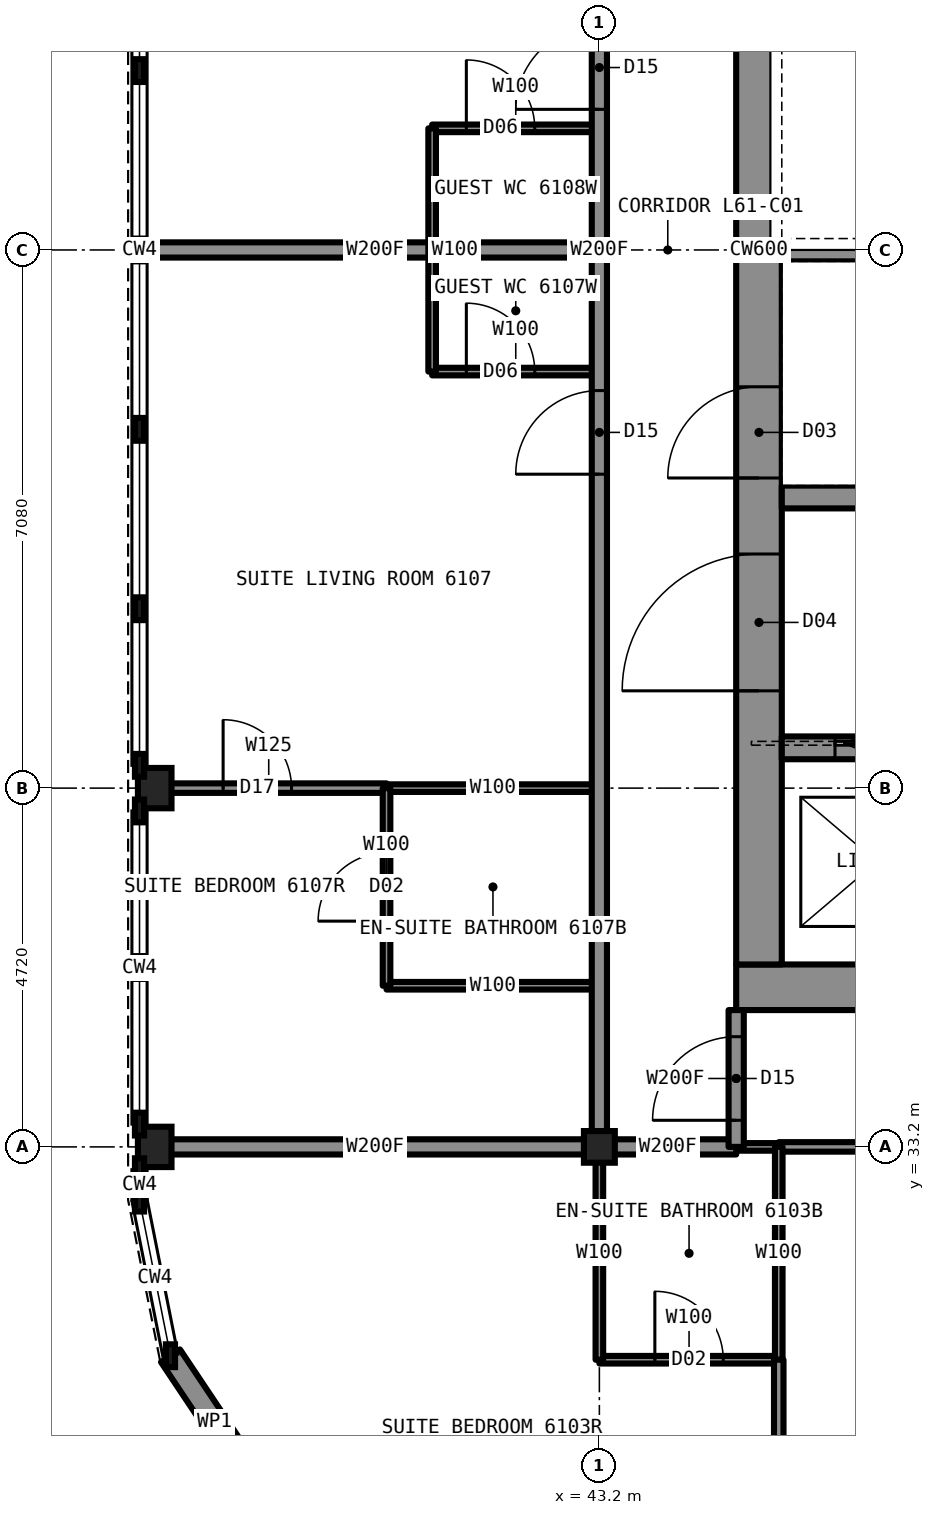
"""IFC4 building model, lengths in metres.
Left out: names, types, materials, properties, quantities, classifications, styles, units other than length and angle.
Written with IfcOpenShell. Run it as: python <this file> out.ifc"""

import sys

from ifc_helpers import new_model, si_unit, direction, frame, frame_2d, origin, origin_2d, place, context, subcontext, project, spatial, rectangle, i_section, extrude, element, fill, save


model = new_model("IFC4")
c1 = context("Model", 3, precision=1e-05, world=origin(), true_north=direction((0.0, 1.0)))
c2 = subcontext(c1, "Body", "Model", "MODEL_VIEW")
j1 = project(units=[si_unit("LENGTHUNIT", "METRE"), si_unit("PLANEANGLEUNIT", "RADIAN")], contexts=[c1])
p1 = place(None, origin())
s1 = spatial("IfcSite", under=j1, at=p1, CompositionType="ELEMENT")
p2 = place(p1, origin())
s2 = spatial("IfcBuilding", under=s1, at=p2, CompositionType="ELEMENT")
p3 = place(p2, frame((0.0, 0.0, 226.7)))
s3 = spatial("IfcBuildingStorey", under=s2, at=p3, CompositionType="ELEMENT", Elevation=226.7)
for number, where, z_axis, x_axis in (
    (1, (37.35, 33.2, 0.0), (0.0, 0.0, 1.0), (1.0, 0.0, 0.0)),
    (2, (37.35, 37.92, 0.0), (0.0, 0.0, 1.0), (1.0, 0.0, 0.0)),
):
    element("IfcColumn", number, at=place(p3, frame(where, z_axis=z_axis, x_axis=x_axis)), inside=s3, PredefinedType="COLUMN", context=c2, shape_type="SweptSolid", body=[
        extrude(i_section(OverallWidth=0.442, OverallDepth=0.531, WebThickness=0.066, FlangeThickness=0.106, at=origin_2d()), origin(), (0.0, 0.0, 1.0), 3.5),
    ])
p4 = place(p3, frame((43.2, 33.2, 0.0), z_axis=(0.0, 0.0, 1.0), x_axis=(1.0, 0.0, 0.0)))
e3 = element("IfcColumn", 3, at=p4, inside=s3, PredefinedType="COLUMN", context=c2, shape_type="SweptSolid", body=[
    extrude(i_section(OverallWidth=0.406, OverallDepth=0.417, WebThickness=0.03, FlangeThickness=0.048, at=origin_2d()), origin(), (0.0, 0.0, 1.0), 3.5),
])
p5 = place(p3, frame((45.0, 35.3, 0.0), z_axis=(0.0, 0.0, 1.0), x_axis=(1.0, 0.0, 0.0)))
e4 = element("IfcWall", 4, at=p5, inside=s3, PredefinedType="SHEAR", context=c2, shape_type="SweptSolid", body=[
    extrude(rectangle(XDim=20.0, YDim=0.6, at=frame_2d((10.0, 0.0))), origin(), (0.0, 0.0, 1.0), 3.5),
])
p6 = place(p3, frame((45.3, 35.6, 0.0), z_axis=(0.0, 0.0, 1.0), x_axis=(0.0, 1.0, 0.0)))
e5 = element("IfcWall", 5, at=p6, inside=s3, PredefinedType="SHEAR", context=c2, shape_type="SweptSolid", body=[
    extrude(rectangle(XDim=18.8, YDim=0.6, at=frame_2d((9.4, 0.0))), origin(), (0.0, 0.0, 1.0), 3.5),
])
p7 = place(p6, frame((13.4, 0.0, 0.0)))
e6 = element("IfcOpeningElement", 6, at=p7, cuts=e5, PredefinedType="OPENING", context=c2, shape_type="SweptSolid", body=[
    extrude(rectangle(XDim=1.8, YDim=2.2, at=frame_2d((0.9, 1.1))), frame((0.0, 0.31, 0.0), z_axis=(0.0, -1.0, 0.0), x_axis=(1.0, 0.0, 0.0)), (0.0, 0.0, 1.0), 0.62),
])
p8 = place(p6, frame((3.6, 0.0, 0.0)))
e7 = element("IfcOpeningElement", 7, at=p8, cuts=e5, PredefinedType="OPENING", context=c2, shape_type="SweptSolid", body=[
    extrude(rectangle(XDim=1.8, YDim=2.2, at=frame_2d((0.9, 1.1))), frame((0.0, 0.31, 0.0), z_axis=(0.0, -1.0, 0.0), x_axis=(1.0, 0.0, 0.0)), (0.0, 0.0, 1.0), 0.62),
])
p9 = place(p6, frame((6.4, 0.0, 0.0)))
e8 = element("IfcOpeningElement", 8, at=p9, cuts=e5, PredefinedType="OPENING", context=c2, shape_type="SweptSolid", body=[
    extrude(rectangle(XDim=1.2, YDim=2.2, at=frame_2d((0.6, 1.1))), frame((0.0, 0.31, 0.0), z_axis=(0.0, -1.0, 0.0), x_axis=(1.0, 0.0, 0.0)), (0.0, 0.0, 1.0), 0.62),
])
p10 = place(p3, frame((45.6, 38.45, 0.0), z_axis=(0.0, 0.0, 1.0), x_axis=(1.0, 0.0, 0.0)))
e9 = element("IfcWall", 9, at=p10, inside=s3, PredefinedType="SHEAR", context=c2, shape_type="SweptSolid", body=[
    extrude(rectangle(XDim=18.8, YDim=0.3, at=frame_2d((9.4, 0.0))), origin(), (0.0, 0.0, 1.0), 3.5),
])
p11 = place(p10, frame((0.7, 0.0, 0.0)))
e10 = element("IfcOpeningElement", 10, at=p11, cuts=e9, PredefinedType="OPENING", context=c2, shape_type="SweptSolid", body=[
    extrude(rectangle(XDim=1.1, YDim=2.2, at=frame_2d((0.55, 1.1))), frame((0.0, 0.16, 0.0), z_axis=(0.0, -1.0, 0.0), x_axis=(1.0, 0.0, 0.0)), (0.0, 0.0, 1.0), 0.32),
])
p12 = place(p10, frame((3.4, 0.0, 0.0)))
e11 = element("IfcOpeningElement", 11, at=p12, cuts=e9, PredefinedType="OPENING", context=c2, shape_type="SweptSolid", body=[
    extrude(rectangle(XDim=1.1, YDim=2.2, at=frame_2d((0.55, 1.1))), frame((0.0, 0.16, 0.0), z_axis=(0.0, -1.0, 0.0), x_axis=(1.0, 0.0, 0.0)), (0.0, 0.0, 1.0), 0.32),
])
p13 = place(p10, frame((6.1, 0.0, 0.0)))
e12 = element("IfcOpeningElement", 12, at=p13, cuts=e9, PredefinedType="OPENING", context=c2, shape_type="SweptSolid", body=[
    extrude(rectangle(XDim=1.1, YDim=2.2, at=frame_2d((0.55, 1.1))), frame((0.0, 0.16, 0.0), z_axis=(0.0, -1.0, 0.0), x_axis=(1.0, 0.0, 0.0)), (0.0, 0.0, 1.0), 0.32),
])
p14 = place(p10, frame((8.8, 0.0, 0.0)))
e13 = element("IfcOpeningElement", 13, at=p14, cuts=e9, PredefinedType="OPENING", context=c2, shape_type="SweptSolid", body=[
    extrude(rectangle(XDim=1.1, YDim=2.2, at=frame_2d((0.55, 1.1))), frame((0.0, 0.16, 0.0), z_axis=(0.0, -1.0, 0.0), x_axis=(1.0, 0.0, 0.0)), (0.0, 0.0, 1.0), 0.32),
])
p15 = place(p3, frame((45.6, 41.75, 0.0), z_axis=(0.0, 0.0, 1.0), x_axis=(1.0, 0.0, 0.0)))
e14 = element("IfcWall", 14, at=p15, inside=s3, PredefinedType="SHEAR", context=c2, shape_type="SweptSolid", body=[
    extrude(rectangle(XDim=7.1, YDim=0.3, at=frame_2d((3.55, 0.0))), origin(), (0.0, 0.0, 1.0), 3.5),
])
p16 = place(p3, frame((45.6, 45.0, 0.0), z_axis=(0.0, 0.0, 1.0), x_axis=(1.0, 0.0, 0.0)))
e15 = element("IfcWall", 15, at=p16, inside=s3, PredefinedType="SHEAR", context=c2, shape_type="SweptSolid", body=[
    extrude(rectangle(XDim=6.8, YDim=0.3, at=frame_2d((3.4, 0.0))), origin(), (0.0, 0.0, 1.0), 3.5),
])
p17 = place(p3, frame((41.0, 43.4, 0.0), z_axis=(0.0, 0.0, 1.0), x_axis=(1.0, 0.0, 0.0)))
e16 = element("IfcWall", 16, at=p17, inside=s3, PredefinedType="PARTITIONING", context=c2, shape_type="SweptSolid", body=[
    extrude(rectangle(XDim=2.2, YDim=0.1, at=frame_2d((1.1, 0.0))), origin(), (0.0, 0.0, 1.0), 3.33),
])
p18 = place(p17, frame((0.45, 0.0, 0.0)))
e17 = element("IfcOpeningElement", 17, at=p18, cuts=e16, PredefinedType="OPENING", context=c2, shape_type="SweptSolid", body=[
    extrude(rectangle(XDim=0.9, YDim=2.1, at=frame_2d((0.45, 1.05))), frame((0.0, 0.06, 0.0), z_axis=(0.0, -1.0, 0.0), x_axis=(1.0, 0.0, 0.0)), (0.0, 0.0, 1.0), 0.12),
])
p19 = place(p3, frame((45.0, 33.2, 0.0), z_axis=(0.0, 0.0, 1.0), x_axis=(1.0, 0.0, 0.0)))
e18 = element("IfcWall", 18, at=p19, inside=s3, PredefinedType="PARTITIONING", context=c2, shape_type="SweptSolid", body=[
    extrude(rectangle(XDim=0.56, YDim=0.1, at=frame_2d((0.28, 0.0))), origin(), (0.0, 0.0, 1.0), 3.33),
])
p20 = place(p3, frame((43.2, 33.2, 0.0), z_axis=(0.0, 0.0, 1.0), x_axis=(1.0, 0.0, 0.0)))
e19 = element("IfcWall", 19, at=p20, inside=s3, PredefinedType="PARTITIONING", context=c2, shape_type="SweptSolid", body=[
    extrude(rectangle(XDim=1.8, YDim=0.2, at=frame_2d((0.9, 0.0))), origin(), (0.0, 0.0, 1.0), 3.33),
])
p21 = place(p3, frame((37.3, 33.2, 0.0), z_axis=(0.0, 0.0, 1.0), x_axis=(1.0, 0.0, 0.0)))
e20 = element("IfcWall", 20, at=p21, inside=s3, PredefinedType="PARTITIONING", context=c2, shape_type="SweptSolid", body=[
    extrude(rectangle(XDim=5.9, YDim=0.2, at=frame_2d((2.95, 0.0))), origin(), (0.0, 0.0, 1.0), 2.573),
])
p22 = place(p3, frame((45.56, 33.2, 0.0), z_axis=(0.0, 0.0, 1.0), x_axis=(1.0, 0.0, 0.0)))
e21 = element("IfcWall", 21, at=p22, inside=s3, PredefinedType="PARTITIONING", context=c2, shape_type="SweptSolid", body=[
    extrude(rectangle(XDim=7.84, YDim=0.125, at=frame_2d((3.92, 0.0))), origin(), (0.0, 0.0, 1.0), 3.33),
])
p23 = place(p22, frame((3.49, 0.0, 0.0)))
e22 = element("IfcOpeningElement", 22, at=p23, cuts=e21, PredefinedType="OPENING", context=c2, shape_type="SweptSolid", body=[
    extrude(rectangle(XDim=0.9, YDim=2.2, at=frame_2d((0.45, 1.1))), frame((0.0, 0.073, 0.0), z_axis=(0.0, -1.0, 0.0), x_axis=(1.0, 0.0, 0.0)), (0.0, 0.0, 1.0), 0.145),
])
p24 = place(p3, frame((43.2, 30.4, 0.0), z_axis=(0.0, 0.0, 1.0), x_axis=(1.0, 0.0, 0.0)))
e23 = element("IfcWall", 23, at=p24, inside=s3, PredefinedType="PARTITIONING", context=c2, shape_type="SweptSolid", body=[
    extrude(rectangle(XDim=2.36, YDim=0.1, at=frame_2d((1.18, 0.0))), origin(), (0.0, 0.0, 1.0), 3.33),
])
p25 = place(p24, frame((0.73, 0.0, 0.0)))
e24 = element("IfcOpeningElement", 24, at=p25, cuts=e23, PredefinedType="OPENING", context=c2, shape_type="SweptSolid", body=[
    extrude(rectangle(XDim=0.9, YDim=2.1, at=frame_2d((0.45, 1.05))), frame((0.0, 0.06, 0.0), z_axis=(0.0, -1.0, 0.0), x_axis=(1.0, 0.0, 0.0)), (0.0, 0.0, 1.0), 0.12),
])
p26 = place(p3, frame((40.4, 37.92, 0.0), z_axis=(0.0, 0.0, 1.0), x_axis=(1.0, 0.0, 0.0)))
e25 = element("IfcWall", 25, at=p26, inside=s3, PredefinedType="PARTITIONING", context=c2, shape_type="SweptSolid", body=[
    extrude(rectangle(XDim=2.8, YDim=0.1, at=frame_2d((1.4, 0.0))), origin(), (0.0, 0.0, 1.0), 2.573),
])
p27 = place(p3, frame((37.3, 37.92, 0.0), z_axis=(0.0, 0.0, 1.0), x_axis=(1.0, 0.0, 0.0)))
e26 = element("IfcWall", 26, at=p27, inside=s3, PredefinedType="PARTITIONING", context=c2, shape_type="SweptSolid", body=[
    extrude(rectangle(XDim=3.1, YDim=0.125, at=frame_2d((1.55, 0.0))), origin(), (0.0, 0.0, 1.0), 2.573),
])
p28 = place(p27, frame((0.95, 0.0, 0.0)))
e27 = element("IfcOpeningElement", 27, at=p28, cuts=e26, PredefinedType="OPENING", context=c2, shape_type="SweptSolid", body=[
    extrude(rectangle(XDim=0.9, YDim=2.2, at=frame_2d((0.45, 1.1))), frame((0.0, 0.073, 0.0), z_axis=(0.0, -1.0, 0.0), x_axis=(1.0, 0.0, 0.0)), (0.0, 0.0, 1.0), 0.145),
])
p29 = place(p3, frame((40.4, 35.32, 0.0), z_axis=(0.0, 0.0, 1.0), x_axis=(1.0, 0.0, 0.0)))
e28 = element("IfcWall", 28, at=p29, inside=s3, PredefinedType="PARTITIONING", context=c2, shape_type="SweptSolid", body=[
    extrude(rectangle(XDim=2.8, YDim=0.1, at=frame_2d((1.4, 0.0))), origin(), (0.0, 0.0, 1.0), 3.33),
])
p30 = place(p3, frame((37.3, 45.0, 0.0), z_axis=(0.0, 0.0, 1.0), x_axis=(1.0, 0.0, 0.0)))
e29 = element("IfcWall", 29, at=p30, inside=s3, PredefinedType="PARTITIONING", context=c2, shape_type="SweptSolid", body=[
    extrude(rectangle(XDim=5.9, YDim=0.2, at=frame_2d((2.95, 0.0))), origin(), (0.0, 0.0, 1.0), 2.797),
])
p31 = place(p3, frame((41.0, 46.6, 0.0), z_axis=(0.0, 0.0, 1.0), x_axis=(1.0, 0.0, 0.0)))
e30 = element("IfcWall", 30, at=p31, inside=s3, PredefinedType="PARTITIONING", context=c2, shape_type="SweptSolid", body=[
    extrude(rectangle(XDim=2.2, YDim=0.1, at=frame_2d((1.1, 0.0))), origin(), (0.0, 0.0, 1.0), 3.33),
])
p32 = place(p31, frame((0.45, 0.0, 0.0)))
e31 = element("IfcOpeningElement", 31, at=p32, cuts=e30, PredefinedType="OPENING", context=c2, shape_type="SweptSolid", body=[
    extrude(rectangle(XDim=0.9, YDim=2.1, at=frame_2d((0.45, 1.05))), frame((0.0, 0.06, 0.0), z_axis=(0.0, -1.0, 0.0), x_axis=(1.0, 0.0, 0.0)), (0.0, 0.0, 1.0), 0.12),
])
p33 = place(p3, frame((45.0, 33.2, 0.0), z_axis=(0.0, 0.0, 1.0), x_axis=(0.0, 1.0, 0.0)))
e32 = element("IfcWall", 32, at=p33, inside=s3, PredefinedType="PARTITIONING", context=c2, shape_type="SweptSolid", body=[
    extrude(rectangle(XDim=1.8, YDim=0.2, at=frame_2d((0.9, 0.0))), origin(), (0.0, 0.0, 1.0), 3.33),
])
p34 = place(p33, frame((0.35, 0.0, 0.0)))
e33 = element("IfcOpeningElement", 33, at=p34, cuts=e32, PredefinedType="OPENING", context=c2, shape_type="SweptSolid", body=[
    extrude(rectangle(XDim=1.1, YDim=2.2, at=frame_2d((0.55, 1.1))), frame((0.0, 0.11, 0.0), z_axis=(0.0, -1.0, 0.0), x_axis=(1.0, 0.0, 0.0)), (0.0, 0.0, 1.0), 0.22),
])
p35 = place(p3, frame((43.2, 30.4, 0.0), z_axis=(0.0, 0.0, 1.0), x_axis=(0.0, 1.0, 0.0)))
e34 = element("IfcWall", 34, at=p35, inside=s3, PredefinedType="PARTITIONING", context=c2, shape_type="SweptSolid", body=[
    extrude(rectangle(XDim=2.8, YDim=0.1, at=frame_2d((1.4, 0.0))), origin(), (0.0, 0.0, 1.0), 2.573),
])
p36 = place(p3, frame((43.2, 33.2, 0.0), z_axis=(0.0, 0.0, 1.0), x_axis=(0.0, 1.0, 0.0)))
e35 = element("IfcWall", 35, at=p36, inside=s3, PredefinedType="PARTITIONING", context=c2, shape_type="SweptSolid", body=[
    extrude(rectangle(XDim=23.6, YDim=0.2, at=frame_2d((11.8, 0.0))), origin(), (0.0, 0.0, 1.0), 3.33),
])
p37 = place(p36, frame((8.85, 0.0, 0.0)))
e36 = element("IfcOpeningElement", 36, at=p37, cuts=e35, PredefinedType="OPENING", context=c2, shape_type="SweptSolid", body=[
    extrude(rectangle(XDim=1.1, YDim=2.2, at=frame_2d((0.55, 1.1))), frame((0.0, 0.11, 0.0), z_axis=(0.0, -1.0, 0.0), x_axis=(1.0, 0.0, 0.0)), (0.0, 0.0, 1.0), 0.22),
])
p38 = place(p36, frame((13.65, 0.0, 0.0)))
e37 = element("IfcOpeningElement", 37, at=p38, cuts=e35, PredefinedType="OPENING", context=c2, shape_type="SweptSolid", body=[
    extrude(rectangle(XDim=1.1, YDim=2.2, at=frame_2d((0.55, 1.1))), frame((0.0, 0.11, 0.0), z_axis=(0.0, -1.0, 0.0), x_axis=(1.0, 0.0, 0.0)), (0.0, 0.0, 1.0), 0.22),
])
p39 = place(p3, frame((41.0, 43.4, 0.0), z_axis=(0.0, 0.0, 1.0), x_axis=(0.0, 1.0, 0.0)))
e38 = element("IfcWall", 38, at=p39, inside=s3, PredefinedType="PARTITIONING", context=c2, shape_type="SweptSolid", body=[
    extrude(rectangle(XDim=3.2, YDim=0.1, at=frame_2d((1.6, 0.0))), origin(), (0.0, 0.0, 1.0), 3.33),
])
p40 = place(p3, frame((40.4, 35.32, 0.0), z_axis=(0.0, 0.0, 1.0), x_axis=(0.0, 1.0, 0.0)))
e39 = element("IfcWall", 39, at=p40, inside=s3, PredefinedType="PARTITIONING", context=c2, shape_type="SweptSolid", body=[
    extrude(rectangle(XDim=2.6, YDim=0.1, at=frame_2d((1.3, 0.0))), origin(), (0.0, 0.0, 1.0), 3.33),
])
p41 = place(p40, frame((0.85, 0.0, 0.0)))
e40 = element("IfcOpeningElement", 40, at=p41, cuts=e39, PredefinedType="OPENING", context=c2, shape_type="SweptSolid", body=[
    extrude(rectangle(XDim=0.9, YDim=2.1, at=frame_2d((0.45, 1.05))), frame((0.0, 0.06, 0.0), z_axis=(0.0, -1.0, 0.0), x_axis=(1.0, 0.0, 0.0)), (0.0, 0.0, 1.0), 0.12),
])
p42 = place(p3, frame((45.56, 30.4, 0.0), z_axis=(0.0, 0.0, 1.0), x_axis=(0.0, 1.0, 0.0)))
e41 = element("IfcWall", 41, at=p42, inside=s3, PredefinedType="PARTITIONING", context=c2, shape_type="SweptSolid", body=[
    extrude(rectangle(XDim=2.8, YDim=0.1, at=frame_2d((1.4, 0.0))), origin(), (0.0, 0.0, 1.0), 3.33),
])
p43 = place(p3, frame((45.56, 27.3, 0.0), z_axis=(0.0, 0.0, 1.0), x_axis=(0.0, 1.0, 0.0)))
e42 = element("IfcWall", 42, at=p43, inside=s3, PredefinedType="PARTITIONING", context=c2, shape_type="SweptSolid", body=[
    extrude(rectangle(XDim=3.1, YDim=0.125, at=frame_2d((1.55, 0.0))), origin(), (0.0, 0.0, 1.0), 3.33),
])
p44 = place(p43, frame((0.95, 0.0, 0.0)))
e43 = element("IfcOpeningElement", 43, at=p44, cuts=e42, PredefinedType="OPENING", context=c2, shape_type="SweptSolid", body=[
    extrude(rectangle(XDim=0.9, YDim=2.2, at=frame_2d((0.45, 1.1))), frame((0.0, 0.073, 0.0), z_axis=(0.0, -1.0, 0.0), x_axis=(1.0, 0.0, 0.0)), (0.0, 0.0, 1.0), 0.145),
])
p45 = place(p3, frame((37.557, 30.453, 0.0), z_axis=(0.0, 0.0, 1.0), x_axis=(0.555644460423, -0.831420010345, 0.0)))
e44 = element("IfcWall", 44, at=p45, inside=s3, PredefinedType="SOLIDWALL", context=c2, shape_type="SweptSolid", body=[
    extrude(rectangle(XDim=2.087, YDim=0.3, at=frame_2d((1.044, 0.0))), origin(), (0.0, 0.0, 1.0), 2.83),
])
p46 = place(p25, origin())
e45 = element("IfcDoor", 45, at=p46, inside=s3, OperationType="SINGLE_SWING_RIGHT", PredefinedType="DOOR", context=c2, shape_type="SweptSolid", body=[
    extrude(rectangle(XDim=0.9, YDim=2.1, at=frame_2d((0.45, 1.05))), frame((0.0, 0.025, 0.0), z_axis=(0.0, -1.0, 0.0), x_axis=(1.0, 0.0, 0.0)), (0.0, 0.0, 1.0), 0.05),
])
fill(e24, e45)
p47 = place(p34, origin())
e46 = element("IfcDoor", 46, at=p47, inside=s3, OperationType="SINGLE_SWING_LEFT", PredefinedType="DOOR", context=c2, shape_type="SweptSolid", body=[
    extrude(rectangle(XDim=1.1, YDim=2.2, at=frame_2d((0.55, 1.1))), frame((0.0, 0.025, 0.0), z_axis=(0.0, -1.0, 0.0), x_axis=(1.0, 0.0, 0.0)), (0.0, 0.0, 1.0), 0.05),
])
fill(e33, e46)
p48 = place(p37, origin())
e47 = element("IfcDoor", 47, at=p48, inside=s3, OperationType="SINGLE_SWING_LEFT", PredefinedType="DOOR", context=c2, shape_type="SweptSolid", body=[
    extrude(rectangle(XDim=1.1, YDim=2.2, at=frame_2d((0.55, 1.1))), frame((0.0, 0.025, 0.0), z_axis=(0.0, -1.0, 0.0), x_axis=(1.0, 0.0, 0.0)), (0.0, 0.0, 1.0), 0.05),
])
fill(e36, e47)
p49 = place(p41, origin())
e48 = element("IfcDoor", 48, at=p49, inside=s3, OperationType="SINGLE_SWING_RIGHT", PredefinedType="DOOR", context=c2, shape_type="SweptSolid", body=[
    extrude(rectangle(XDim=0.9, YDim=2.1, at=frame_2d((0.45, 1.05))), frame((0.0, 0.025, 0.0), z_axis=(0.0, -1.0, 0.0), x_axis=(1.0, 0.0, 0.0)), (0.0, 0.0, 1.0), 0.05),
])
fill(e40, e48)
p50 = place(p28, origin())
e49 = element("IfcDoor", 49, at=p50, inside=s3, OperationType="SINGLE_SWING_LEFT", PredefinedType="DOOR", context=c2, shape_type="SweptSolid", body=[
    extrude(rectangle(XDim=0.9, YDim=2.2, at=frame_2d((0.45, 1.1))), frame((0.0, 0.025, 0.0), z_axis=(0.0, -1.0, 0.0), x_axis=(1.0, 0.0, 0.0)), (0.0, 0.0, 1.0), 0.05),
])
fill(e27, e49)
p51 = place(p18, origin())
e50 = element("IfcDoor", 50, at=p51, inside=s3, OperationType="SINGLE_SWING_LEFT", PredefinedType="DOOR", context=c2, shape_type="SweptSolid", body=[
    extrude(rectangle(XDim=0.9, YDim=2.1, at=frame_2d((0.45, 1.05))), frame((0.0, 0.025, 0.0), z_axis=(0.0, -1.0, 0.0), x_axis=(1.0, 0.0, 0.0)), (0.0, 0.0, 1.0), 0.05),
])
fill(e17, e50)
p52 = place(p38, origin())
e51 = element("IfcDoor", 51, at=p52, inside=s3, OperationType="SINGLE_SWING_LEFT", PredefinedType="DOOR", context=c2, shape_type="SweptSolid", body=[
    extrude(rectangle(XDim=1.1, YDim=2.2, at=frame_2d((0.55, 1.1))), frame((0.0, 0.025, 0.0), z_axis=(0.0, -1.0, 0.0), x_axis=(1.0, 0.0, 0.0)), (0.0, 0.0, 1.0), 0.05),
])
fill(e37, e51)
p53 = place(p32, origin())
e52 = element("IfcDoor", 52, at=p53, inside=s3, OperationType="SINGLE_SWING_LEFT", PredefinedType="DOOR", context=c2, shape_type="SweptSolid", body=[
    extrude(rectangle(XDim=0.9, YDim=2.1, at=frame_2d((0.45, 1.05))), frame((0.0, 0.025, 0.0), z_axis=(0.0, -1.0, 0.0), x_axis=(1.0, 0.0, 0.0)), (0.0, 0.0, 1.0), 0.05),
])
fill(e31, e52)
p54 = place(p8, origin())
e53 = element("IfcDoor", 53, at=p54, inside=s3, OperationType="DOUBLE_DOOR_SINGLE_SWING", PredefinedType="DOOR", context=c2, shape_type="SweptSolid", body=[
    extrude(rectangle(XDim=1.8, YDim=2.2, at=frame_2d((0.9, 1.1))), frame((0.0, 0.025, 0.0), z_axis=(0.0, -1.0, 0.0), x_axis=(1.0, 0.0, 0.0)), (0.0, 0.0, 1.0), 0.05),
])
fill(e7, e53)
p55 = place(p9, origin())
e54 = element("IfcDoor", 54, at=p55, inside=s3, OperationType="SINGLE_SWING_LEFT", PredefinedType="DOOR", context=c2, shape_type="SweptSolid", body=[
    extrude(rectangle(XDim=1.2, YDim=2.2, at=frame_2d((0.6, 1.1))), frame((0.0, 0.025, 0.0), z_axis=(0.0, -1.0, 0.0), x_axis=(1.0, 0.0, 0.0)), (0.0, 0.0, 1.0), 0.05),
])
fill(e8, e54)
p56 = place(p11, origin())
e55 = element("IfcDoor", 55, at=p56, inside=s3, OperationType="SLIDING_TO_LEFT", PredefinedType="DOOR", context=c2, shape_type="SweptSolid", body=[
    extrude(rectangle(XDim=1.1, YDim=2.2, at=frame_2d((0.55, 1.1))), frame((0.0, 0.025, 0.0), z_axis=(0.0, -1.0, 0.0), x_axis=(1.0, 0.0, 0.0)), (0.0, 0.0, 1.0), 0.05),
])
fill(e10, e55)
save(model, sys.argv[1])
